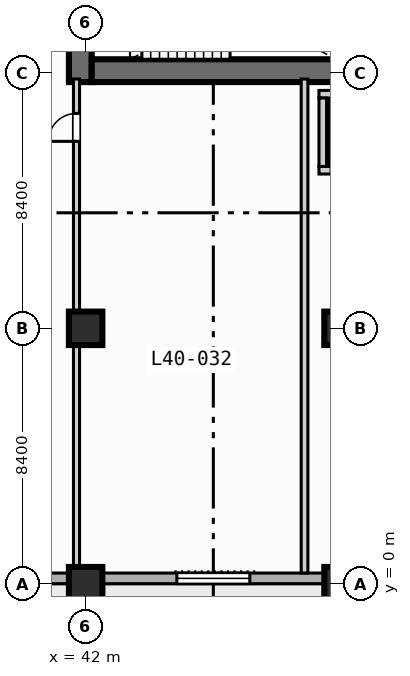
"""IFC4 building model, lengths in metres.
Left out: names, types, materials, properties, quantities, classifications, styles, units other than length and angle.
Written with IfcOpenShell. Run it as: python <this file> out.ifc"""

import sys

from ifc_helpers import new_model, si_unit, direction, frame, frame_2d, origin, origin_2d, place, context, subcontext, project, spatial, rectangle, extrude, element, fill, save


model = new_model("IFC4")
c1 = context("Model", 3, precision=1e-05, world=origin(), true_north=direction((0.0, 1.0)))
c2 = subcontext(c1, "Body", "Model", "MODEL_VIEW")
j1 = project(units=[si_unit("LENGTHUNIT", "METRE"), si_unit("PLANEANGLEUNIT", "RADIAN")], contexts=[c1])
p1 = place(None, origin())
s1 = spatial("IfcSite", under=j1, at=p1, CompositionType="ELEMENT")
p2 = place(p1, origin())
s2 = spatial("IfcBuilding", under=s1, at=p2, CompositionType="ELEMENT")
p3 = place(p2, frame((0.0, 0.0, 168.0)))
s3 = spatial("IfcBuildingStorey", under=s2, at=p3, CompositionType="ELEMENT", Elevation=168.0)
p4 = place(p3, frame((41.825, 16.5, 0.0), z_axis=(0.0, 0.0, 1.0), x_axis=(0.0, 1.0, 0.0)))
e1 = element("IfcWall", 1, at=p4, inside=s3, PredefinedType="SHEAR", context=c2, shape_type="SweptSolid", body=[
    extrude(rectangle(XDim=1.5, YDim=0.75, at=frame_2d((0.75, 0.0))), origin(), (0.0, 0.0, 1.0), 3.47),
])
p5 = place(p3, frame((42.2, 16.875, 0.0), z_axis=(0.0, 0.0, 1.0), x_axis=(1.0, 0.0, 0.0)))
e2 = element("IfcWall", 2, at=p5, inside=s3, PredefinedType="SHEAR", context=c2, shape_type="SweptSolid", body=[
    extrude(rectangle(XDim=16.35, YDim=0.75, at=frame_2d((8.175, 0.0))), origin(), (0.0, 0.0, 1.0), 3.47),
])
for number, where, z_axis, x_axis in (
    (3, (42.0, 0.0, 0.0), (0.0, 0.0, 1.0), (1.0, 0.0, 0.0)),
    (4, (42.0, 8.4, 0.0), (0.0, 0.0, 1.0), (1.0, 0.0, 0.0)),
    (5, (50.4, 0.0, 0.0), (0.0, 0.0, 1.0), (1.0, 0.0, 0.0)),
    (6, (50.4, 8.4, 0.0), (0.0, 0.0, 1.0), (1.0, 0.0, 0.0)),
):
    element("IfcColumn", number, at=place(p3, frame(where, z_axis=z_axis, x_axis=x_axis)), inside=s3, PredefinedType="COLUMN", context=c2, shape_type="SweptSolid", body=[
        extrude(rectangle(XDim=1.1, YDim=1.1, at=origin_2d()), origin(), (0.0, 0.0, 1.0), 3.7),
    ])
p6 = place(p3, frame((72.425, 0.175, 0.0), z_axis=(0.0, 0.0, 1.0), x_axis=(-1.0, 0.0, 0.0)))
e7 = element("IfcWall", 7, at=p6, inside=s3, PredefinedType="STANDARD", context=c2, shape_type="SweptSolid", body=[
    extrude(rectangle(XDim=69.25, YDim=0.35, at=frame_2d((34.625, 0.0))), origin(), (0.0, 0.0, 1.0), 3.47),
])
p7 = place(p6, frame((51.725, 0.0, 0.0)))
e8 = element("IfcOpeningElement", 8, at=p7, cuts=e7, PredefinedType="OPENING", context=c2, shape_type="SweptSolid", body=[
    extrude(rectangle(XDim=1.4, YDim=2.2, at=frame_2d((0.7, 1.1))), frame((0.0, 0.185, 0.0), z_axis=(0.0, -1.0, 0.0), x_axis=(1.0, 0.0, 0.0)), (0.0, 0.0, 1.0), 0.37),
])
p8 = place(p6, frame((33.725, 0.0, 0.85)))
e9 = element("IfcOpeningElement", 9, at=p8, cuts=e7, PredefinedType="OPENING", context=c2, shape_type="SweptSolid", body=[
    extrude(rectangle(XDim=1.8, YDim=1.8, at=frame_2d((0.9, 0.9))), frame((0.0, 0.185, 0.0), z_axis=(0.0, -1.0, 0.0), x_axis=(1.0, 0.0, 0.0)), (0.0, 0.0, 1.0), 0.37),
])
p9 = place(p6, frame((25.025, 0.0, 0.85)))
e10 = element("IfcOpeningElement", 10, at=p9, cuts=e7, PredefinedType="OPENING", context=c2, shape_type="SweptSolid", body=[
    extrude(rectangle(XDim=2.4, YDim=1.95, at=frame_2d((1.2, 0.975))), frame((0.0, 0.185, 0.0), z_axis=(0.0, -1.0, 0.0), x_axis=(1.0, 0.0, 0.0)), (0.0, 0.0, 1.0), 0.37),
])
p10 = place(p6, frame((8.225, 0.0, 0.85)))
e11 = element("IfcOpeningElement", 11, at=p10, cuts=e7, PredefinedType="OPENING", context=c2, shape_type="SweptSolid", body=[
    extrude(rectangle(XDim=2.4, YDim=1.95, at=frame_2d((1.2, 0.975))), frame((0.0, 0.185, 0.0), z_axis=(0.0, -1.0, 0.0), x_axis=(1.0, 0.0, 0.0)), (0.0, 0.0, 1.0), 0.37),
])
p11 = place(p6, frame((64.725, 0.0, 0.85)))
e12 = element("IfcOpeningElement", 12, at=p11, cuts=e7, PredefinedType="OPENING", context=c2, shape_type="SweptSolid", body=[
    extrude(rectangle(XDim=1.8, YDim=1.8, at=frame_2d((0.9, 0.9))), frame((0.0, 0.185, 0.0), z_axis=(0.0, -1.0, 0.0), x_axis=(1.0, 0.0, 0.0)), (0.0, 0.0, 1.0), 0.37),
])
p12 = place(p6, frame((44.675, 0.0, 0.85)))
e13 = element("IfcOpeningElement", 13, at=p12, cuts=e7, PredefinedType="OPENING", context=c2, shape_type="SweptSolid", body=[
    extrude(rectangle(XDim=1.8, YDim=1.8, at=frame_2d((0.9, 0.9))), frame((0.0, 0.185, 0.0), z_axis=(0.0, -1.0, 0.0), x_axis=(1.0, 0.0, 0.0)), (0.0, 0.0, 1.0), 0.37),
])
p13 = place(p3, frame((49.675, 13.6, 0.0), z_axis=(0.0, 0.0, 1.0), x_axis=(1.0, 0.0, 0.0)))
e14 = element("IfcWall", 14, at=p13, inside=s3, PredefinedType="SOLIDWALL", context=c2, shape_type="SweptSolid", body=[
    extrude(rectangle(XDim=2.25, YDim=0.25, at=frame_2d((1.125, 0.0))), origin(), (0.0, 0.0, 1.0), 3.47),
])
p14 = place(p13, frame((0.4, 0.0, 0.0)))
e15 = element("IfcOpeningElement", 15, at=p14, cuts=e14, PredefinedType="OPENING", context=c2, shape_type="SweptSolid", body=[
    extrude(rectangle(XDim=1.1, YDim=2.15, at=frame_2d((0.55, 1.075))), frame((0.0, 0.135, 0.0), z_axis=(0.0, -1.0, 0.0), x_axis=(1.0, 0.0, 0.0)), (0.0, 0.0, 1.0), 0.27),
])
for number, where, z_axis, x_axis in (
    (16, (49.675, 16.1, 0.0), (0.0, 0.0, 1.0), (1.0, 0.0, 0.0)),
    (17, (49.8, 13.725, 0.0), (0.0, 0.0, 1.0), (0.0, 1.0, 0.0)),
):
    element("IfcWall", number, at=place(p3, frame(where, z_axis=z_axis, x_axis=x_axis)), inside=s3, PredefinedType="SOLIDWALL", context=c2, shape_type="SweptSolid", body=[
        extrude(rectangle(XDim=2.25, YDim=0.25, at=frame_2d((1.125, 0.0))), origin(), (0.0, 0.0, 1.0), 3.47),
    ])
p15 = place(p3, frame((41.7, 0.35, 0.0), z_axis=(0.0, 0.0, 1.0), x_axis=(0.0, 1.0, 0.0)))
e18 = element("IfcWall", 18, at=p15, inside=s3, PredefinedType="PARTITIONING", context=c2, shape_type="SweptSolid", body=[
    extrude(rectangle(XDim=16.25, YDim=0.2, at=frame_2d((8.125, 0.0))), origin(), (0.0, 0.0, 1.0), 2.82),
])
p16 = place(p15, frame((14.2, 0.0, 0.0)))
e19 = element("IfcOpeningElement", 19, at=p16, cuts=e18, PredefinedType="OPENING", context=c2, shape_type="SweptSolid", body=[
    extrude(rectangle(XDim=0.92, YDim=2.1, at=frame_2d((0.46, 1.05))), frame((0.0, 0.11, 0.0), z_axis=(0.0, -1.0, 0.0), x_axis=(1.0, 0.0, 0.0)), (0.0, 0.0, 1.0), 0.22),
])
p17 = place(p3, frame((49.2, 0.35, 0.0), z_axis=(0.0, 0.0, 1.0), x_axis=(0.0, 1.0, 0.0)))
e20 = element("IfcWall", 20, at=p17, inside=s3, PredefinedType="PARTITIONING", context=c2, shape_type="SweptSolid", body=[
    extrude(rectangle(XDim=16.25, YDim=0.22, at=frame_2d((8.125, 0.0))), origin(), (0.0, 0.0, 1.0), 3.47),
])
p18 = place(p9, origin())
e21 = element("IfcWindow", 21, at=p18, inside=s3, PartitioningType="SINGLE_PANEL", PredefinedType="WINDOW", context=c2, shape_type="SweptSolid", body=[
    extrude(rectangle(XDim=2.4, YDim=1.95, at=frame_2d((1.2, 0.975))), frame((0.0, 0.03, 0.0), z_axis=(0.0, -1.0, 0.0), x_axis=(1.0, 0.0, 0.0)), (0.0, 0.0, 1.0), 0.06),
])
fill(e10, e21)
p19 = place(p16, origin())
e22 = element("IfcDoor", 22, at=p19, inside=s3, OperationType="SINGLE_SWING_LEFT", PredefinedType="DOOR", context=c2, shape_type="SweptSolid", body=[
    extrude(rectangle(XDim=0.92, YDim=2.1, at=frame_2d((0.46, 1.05))), frame((0.0, 0.025, 0.0), z_axis=(0.0, -1.0, 0.0), x_axis=(1.0, 0.0, 0.0)), (0.0, 0.0, 1.0), 0.05),
])
fill(e19, e22)
save(model, sys.argv[1])
